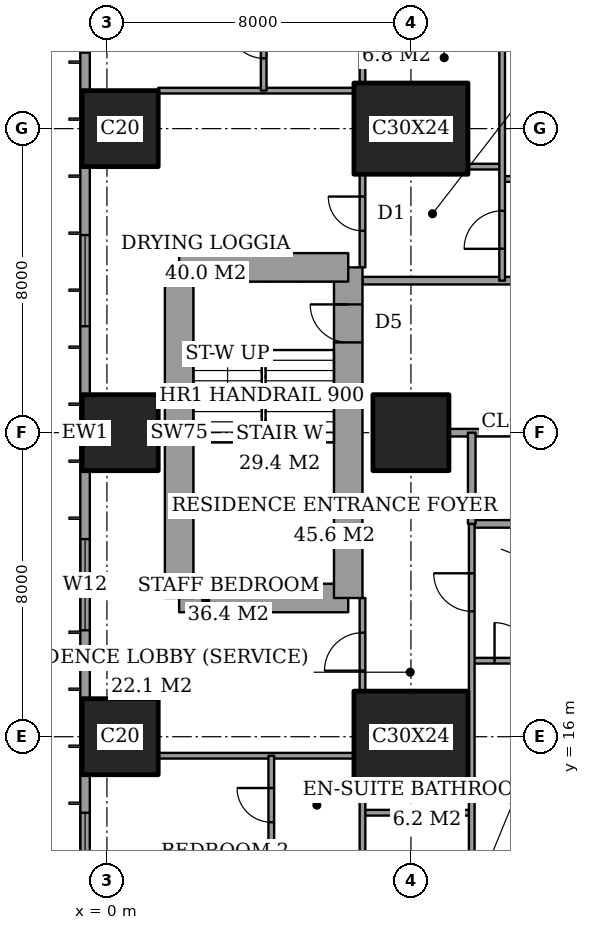
"""IFC4 building model, lengths in metres.
Left out: names, types, materials, properties, quantities, classifications, styles, units other than length and angle.
Written with IfcOpenShell. Run it as: python <this file> out.ifc"""

import sys

from ifc_helpers import new_model, si_unit, direction, frame, frame_2d, origin, origin_2d, place, context, subcontext, project, spatial, rectangle, extrude, element, fill, save


model = new_model("IFC4")
c1 = context("Model", 3, precision=1e-05, world=origin(), true_north=direction((0.0, 1.0)))
c2 = subcontext(c1, "Body", "Model", "MODEL_VIEW")
j1 = project(units=[si_unit("LENGTHUNIT", "METRE"), si_unit("PLANEANGLEUNIT", "RADIAN")], contexts=[c1])
p1 = place(None, origin())
s1 = spatial("IfcSite", under=j1, at=p1, CompositionType="ELEMENT")
p2 = place(p1, origin())
s2 = spatial("IfcBuilding", under=s1, at=p2, CompositionType="ELEMENT")
p3 = place(p2, frame((0.0, 0.0, 164.6)))
s3 = spatial("IfcBuildingStorey", under=s2, at=p3, CompositionType="ELEMENT", Elevation=164.6)
for number, where, z_axis, x_axis in (
    (1, (0.35, 16.0, 0.0), (0.0, 0.0, 1.0), (1.0, 0.0, 0.0)),
    (2, (0.35, 24.0, 0.0), (0.0, 0.0, 1.0), (1.0, 0.0, 0.0)),
    (3, (0.35, 32.0, 0.0), (0.0, 0.0, 1.0), (1.0, 0.0, 0.0)),
):
    element("IfcColumn", number, at=place(p3, frame(where, z_axis=z_axis, x_axis=x_axis)), inside=s3, PredefinedType="COLUMN", context=c2, shape_type="SweptSolid", body=[
        extrude(rectangle(XDim=2.0, YDim=2.0, at=origin_2d()), origin(), (0.0, 0.0, 1.0), 3.6),
    ])
p4 = place(p3, frame((8.0, 16.0, 0.0), z_axis=(0.0, 0.0, 1.0), x_axis=(1.0, 0.0, 0.0)))
e4 = element("IfcColumn", 4, at=p4, inside=s3, PredefinedType="COLUMN", context=c2, shape_type="SweptSolid", body=[
    extrude(rectangle(XDim=3.0, YDim=2.4, at=origin_2d()), origin(), (0.0, 0.0, 1.0), 3.6),
])
p5 = place(p3, frame((8.0, 24.0, 0.0), z_axis=(0.0, 0.0, 1.0), x_axis=(1.0, 0.0, 0.0)))
e5 = element("IfcColumn", 5, at=p5, inside=s3, PredefinedType="COLUMN", context=c2, shape_type="SweptSolid", body=[
    extrude(rectangle(XDim=2.0, YDim=2.0, at=origin_2d()), origin(), (0.0, 0.0, 1.0), 3.6),
])
p6 = place(p3, frame((8.0, 32.0, 0.0), z_axis=(0.0, 0.0, 1.0), x_axis=(1.0, 0.0, 0.0)))
e6 = element("IfcColumn", 6, at=p6, inside=s3, PredefinedType="COLUMN", context=c2, shape_type="SweptSolid", body=[
    extrude(rectangle(XDim=3.0, YDim=2.4, at=origin_2d()), origin(), (0.0, 0.0, 1.0), 3.6),
])
p7 = place(p3, frame((1.9, 19.65, 0.0), z_axis=(0.0, 0.0, 1.0), x_axis=(1.0, 0.0, 0.0)))
e7 = element("IfcWall", 7, at=p7, inside=s3, PredefinedType="SHEAR", context=c2, shape_type="SweptSolid", body=[
    extrude(rectangle(XDim=4.45, YDim=0.75, at=frame_2d((2.225, 0.0))), origin(), (0.0, 0.0, 1.0), 3.6),
])
p8 = place(p3, frame((6.35, 19.65, 0.0), z_axis=(0.0, 0.0, 1.0), x_axis=(0.0, 1.0, 0.0)))
e8 = element("IfcWall", 8, at=p8, inside=s3, PredefinedType="SHEAR", context=c2, shape_type="SweptSolid", body=[
    extrude(rectangle(XDim=8.7, YDim=0.75, at=frame_2d((4.35, 0.0))), origin(), (0.0, 0.0, 1.0), 3.6),
])
p9 = place(p8, frame((6.725, 0.0, 0.0)))
e9 = element("IfcOpeningElement", 9, at=p9, cuts=e8, PredefinedType="OPENING", context=c2, shape_type="SweptSolid", body=[
    extrude(rectangle(XDim=1.0, YDim=2.1, at=frame_2d((0.5, 1.05))), frame((0.0, 0.385, 0.0), z_axis=(0.0, -1.0, 0.0), x_axis=(1.0, 0.0, 0.0)), (0.0, 0.0, 1.0), 0.77),
])
p10 = place(p3, frame((6.35, 28.35, 0.0), z_axis=(0.0, 0.0, 1.0), x_axis=(-1.0, 0.0, 0.0)))
e10 = element("IfcWall", 10, at=p10, inside=s3, PredefinedType="SHEAR", context=c2, shape_type="SweptSolid", body=[
    extrude(rectangle(XDim=4.45, YDim=0.75, at=frame_2d((2.225, 0.0))), origin(), (0.0, 0.0, 1.0), 3.6),
])
p11 = place(p3, frame((1.9, 28.35, 0.0), z_axis=(0.0, 0.0, 1.0), x_axis=(0.0, -1.0, 0.0)))
e11 = element("IfcWall", 11, at=p11, inside=s3, PredefinedType="SHEAR", context=c2, shape_type="SweptSolid", body=[
    extrude(rectangle(XDim=8.7, YDim=0.75, at=frame_2d((4.35, 0.0))), origin(), (0.0, 0.0, 1.0), 3.6),
])
p12 = place(p3, frame((-0.575, 44.825, 0.0), z_axis=(0.0, 0.0, 1.0), x_axis=(0.0, -1.0, 0.0)))
e12 = element("IfcWall", 12, at=p12, inside=s3, PredefinedType="SOLIDWALL", context=c2, shape_type="SweptSolid", body=[
    extrude(rectangle(XDim=41.65, YDim=0.25, at=frame_2d((20.825, 0.0))), origin(), (0.0, 0.0, 1.0), 3.6),
])
p13 = place(p12, frame((0.775, 0.0, 0.4)))
e13 = element("IfcOpeningElement", 13, at=p13, cuts=e12, PredefinedType="OPENING", context=c2, shape_type="SweptSolid", body=[
    extrude(rectangle(XDim=2.4, YDim=2.2, at=frame_2d((1.2, 1.1))), frame((0.0, 0.135, 0.0), z_axis=(0.0, -1.0, 0.0), x_axis=(1.0, 0.0, 0.0)), (0.0, 0.0, 1.0), 0.27),
])
p14 = place(p12, frame((6.1, 0.0, 0.4)))
e14 = element("IfcOpeningElement", 14, at=p14, cuts=e12, PredefinedType="OPENING", context=c2, shape_type="SweptSolid", body=[
    extrude(rectangle(XDim=1.2, YDim=2.2, at=frame_2d((0.6, 1.1))), frame((0.0, 0.135, 0.0), z_axis=(0.0, -1.0, 0.0), x_axis=(1.0, 0.0, 0.0)), (0.0, 0.0, 1.0), 0.27),
])
p15 = place(p12, frame((8.425, 0.0, 0.4)))
e15 = element("IfcOpeningElement", 15, at=p15, cuts=e12, PredefinedType="OPENING", context=c2, shape_type="SweptSolid", body=[
    extrude(rectangle(XDim=2.4, YDim=2.2, at=frame_2d((1.2, 1.1))), frame((0.0, 0.135, 0.0), z_axis=(0.0, -1.0, 0.0), x_axis=(1.0, 0.0, 0.0)), (0.0, 0.0, 1.0), 0.27),
])
p16 = place(p12, frame((15.625, 0.0, 0.4)))
e16 = element("IfcOpeningElement", 16, at=p16, cuts=e12, PredefinedType="OPENING", context=c2, shape_type="SweptSolid", body=[
    extrude(rectangle(XDim=2.4, YDim=2.2, at=frame_2d((1.2, 1.1))), frame((0.0, 0.135, 0.0), z_axis=(0.0, -1.0, 0.0), x_axis=(1.0, 0.0, 0.0)), (0.0, 0.0, 1.0), 0.27),
])
p17 = place(p12, frame((23.625, 0.0, 0.4)))
e17 = element("IfcOpeningElement", 17, at=p17, cuts=e12, PredefinedType="OPENING", context=c2, shape_type="SweptSolid", body=[
    extrude(rectangle(XDim=2.4, YDim=2.2, at=frame_2d((1.2, 1.1))), frame((0.0, 0.135, 0.0), z_axis=(0.0, -1.0, 0.0), x_axis=(1.0, 0.0, 0.0)), (0.0, 0.0, 1.0), 0.27),
])
p18 = place(p12, frame((30.825, 0.0, 0.4)))
e18 = element("IfcOpeningElement", 18, at=p18, cuts=e12, PredefinedType="OPENING", context=c2, shape_type="SweptSolid", body=[
    extrude(rectangle(XDim=2.4, YDim=2.2, at=frame_2d((1.2, 1.1))), frame((0.0, 0.135, 0.0), z_axis=(0.0, -1.0, 0.0), x_axis=(1.0, 0.0, 0.0)), (0.0, 0.0, 1.0), 0.27),
])
p19 = place(p12, frame((34.5, 0.0, 0.4)))
e19 = element("IfcOpeningElement", 19, at=p19, cuts=e12, PredefinedType="OPENING", context=c2, shape_type="SweptSolid", body=[
    extrude(rectangle(XDim=1.2, YDim=2.2, at=frame_2d((0.6, 1.1))), frame((0.0, 0.135, 0.0), z_axis=(0.0, -1.0, 0.0), x_axis=(1.0, 0.0, 0.0)), (0.0, 0.0, 1.0), 0.27),
])
p20 = place(p12, frame((38.475, 0.0, 0.4)))
e20 = element("IfcOpeningElement", 20, at=p20, cuts=e12, PredefinedType="OPENING", context=c2, shape_type="SweptSolid", body=[
    extrude(rectangle(XDim=2.4, YDim=2.2, at=frame_2d((1.2, 1.1))), frame((0.0, 0.135, 0.0), z_axis=(0.0, -1.0, 0.0), x_axis=(1.0, 0.0, 0.0)), (0.0, 0.0, 1.0), 0.27),
])
p21 = place(p3, frame((6.725, 14.0, 0.0), z_axis=(0.0, 0.0, 1.0), x_axis=(1.0, 0.0, 0.0)))
e21 = element("IfcWall", 21, at=p21, inside=s3, PredefinedType="PARTITIONING", context=c2, shape_type="SweptSolid", body=[
    extrude(rectangle(XDim=2.875, YDim=0.15, at=frame_2d((1.438, 0.0))), origin(), (0.0, 0.0, 1.0), 3.35),
])
p22 = place(p3, frame((1.35, 15.5, 0.0), z_axis=(0.0, 0.0, 1.0), x_axis=(1.0, 0.0, 0.0)))
e22 = element("IfcWall", 22, at=p22, inside=s3, PredefinedType="PARTITIONING", context=c2, shape_type="SweptSolid", body=[
    extrude(rectangle(XDim=5.15, YDim=0.15, at=frame_2d((2.575, 0.0))), origin(), (0.0, 0.0, 1.0), 3.35),
])
p23 = place(p3, frame((9.6, 18.0, 0.0), z_axis=(0.0, 0.0, 1.0), x_axis=(1.0, 0.0, 0.0)))
e23 = element("IfcWall", 23, at=p23, inside=s3, PredefinedType="PARTITIONING", context=c2, shape_type="SweptSolid", body=[
    extrude(rectangle(XDim=4.8, YDim=0.15, at=frame_2d((2.4, 0.0))), origin(), (0.0, 0.0, 1.0), 3.35),
])
p24 = place(p23, frame((0.6, 0.0, 0.0)))
e24 = element("IfcOpeningElement", 24, at=p24, cuts=e23, PredefinedType="OPENING", context=c2, shape_type="SweptSolid", body=[
    extrude(rectangle(XDim=1.0, YDim=2.1, at=frame_2d((0.5, 1.05))), frame((0.0, 0.085, 0.0), z_axis=(0.0, -1.0, 0.0), x_axis=(1.0, 0.0, 0.0)), (0.0, 0.0, 1.0), 0.17),
])
p25 = place(p3, frame((9.6, 21.6, 0.0), z_axis=(0.0, 0.0, 1.0), x_axis=(1.0, 0.0, 0.0)))
e25 = element("IfcWall", 25, at=p25, inside=s3, PredefinedType="PARTITIONING", context=c2, shape_type="SweptSolid", body=[
    extrude(rectangle(XDim=5.2, YDim=0.2, at=frame_2d((2.6, 0.0))), origin(), (0.0, 0.0, 1.0), 3.35),
])
p26 = place(p25, frame((2.15, 0.0, 0.0)))
e26 = element("IfcOpeningElement", 26, at=p26, cuts=e25, PredefinedType="OPENING", context=c2, shape_type="SweptSolid", body=[
    extrude(rectangle(XDim=0.9, YDim=2.1, at=frame_2d((0.45, 1.05))), frame((0.0, 0.11, 0.0), z_axis=(0.0, -1.0, 0.0), x_axis=(1.0, 0.0, 0.0)), (0.0, 0.0, 1.0), 0.22),
])
p27 = place(p3, frame((9.0, 24.0, 0.0), z_axis=(0.0, 0.0, 1.0), x_axis=(1.0, 0.0, 0.0)))
e27 = element("IfcWall", 27, at=p27, inside=s3, PredefinedType="PARTITIONING", context=c2, shape_type="SweptSolid", body=[
    extrude(rectangle(XDim=6.0, YDim=0.2, at=frame_2d((3.0, 0.0))), origin(), (0.0, 0.0, 1.0), 3.35),
])
p28 = place(p3, frame((6.725, 28.0, 0.0), z_axis=(0.0, 0.0, 1.0), x_axis=(1.0, 0.0, 0.0)))
e28 = element("IfcWall", 28, at=p28, inside=s3, PredefinedType="PARTITIONING", context=c2, shape_type="SweptSolid", body=[
    extrude(rectangle(XDim=17.275, YDim=0.2, at=frame_2d((8.637, 0.0))), origin(), (0.0, 0.0, 1.0), 3.35),
])
p29 = place(p28, frame((6.875, 0.0, 0.0)))
e29 = element("IfcOpeningElement", 29, at=p29, cuts=e28, PredefinedType="OPENING", context=c2, shape_type="SweptSolid", body=[
    extrude(rectangle(XDim=1.2, YDim=2.4, at=frame_2d((0.6, 1.2))), frame((0.0, 0.11, 0.0), z_axis=(0.0, -1.0, 0.0), x_axis=(1.0, 0.0, 0.0)), (0.0, 0.0, 1.0), 0.22),
])
p30 = place(p3, frame((10.4, 30.675, 0.0), z_axis=(0.0, 0.0, 1.0), x_axis=(1.0, 0.0, 0.0)))
e30 = element("IfcWall", 30, at=p30, inside=s3, PredefinedType="PARTITIONING", context=c2, shape_type="SweptSolid", body=[
    extrude(rectangle(XDim=4.0, YDim=0.15, at=frame_2d((2.0, 0.0))), origin(), (0.0, 0.0, 1.0), 3.35),
])
p31 = place(p30, frame((0.6, 0.0, 0.0)))
e31 = element("IfcOpeningElement", 31, at=p31, cuts=e30, PredefinedType="OPENING", context=c2, shape_type="SweptSolid", body=[
    extrude(rectangle(XDim=1.0, YDim=2.1, at=frame_2d((0.5, 1.05))), frame((0.0, 0.085, 0.0), z_axis=(0.0, -1.0, 0.0), x_axis=(1.0, 0.0, 0.0)), (0.0, 0.0, 1.0), 0.17),
])
p32 = place(p3, frame((9.5, 31.0, 0.0), z_axis=(0.0, 0.0, 1.0), x_axis=(1.0, 0.0, 0.0)))
e32 = element("IfcWall", 32, at=p32, inside=s3, PredefinedType="PARTITIONING", context=c2, shape_type="SweptSolid", body=[
    extrude(rectangle(XDim=0.9, YDim=0.15, at=frame_2d((0.45, 0.0))), origin(), (0.0, 0.0, 1.0), 3.35),
])
p33 = place(p3, frame((1.35, 33.0, 0.0), z_axis=(0.0, 0.0, 1.0), x_axis=(1.0, 0.0, 0.0)))
e33 = element("IfcWall", 33, at=p33, inside=s3, PredefinedType="PARTITIONING", context=c2, shape_type="SweptSolid", body=[
    extrude(rectangle(XDim=5.15, YDim=0.15, at=frame_2d((2.575, 0.0))), origin(), (0.0, 0.0, 1.0), 3.35),
])
p34 = place(p3, frame((4.125, 33.0, 0.0), z_axis=(0.0, 0.0, 1.0), x_axis=(0.0, 1.0, 0.0)))
e34 = element("IfcWall", 34, at=p34, inside=s3, PredefinedType="PARTITIONING", context=c2, shape_type="SweptSolid", body=[
    extrude(rectangle(XDim=2.6, YDim=0.15, at=frame_2d((1.3, 0.0))), origin(), (0.0, 0.0, 1.0), 3.35),
])
p35 = place(p34, frame((0.85, 0.0, 0.0)))
e35 = element("IfcOpeningElement", 35, at=p35, cuts=e34, PredefinedType="OPENING", context=c2, shape_type="SweptSolid", body=[
    extrude(rectangle(XDim=0.9, YDim=2.1, at=frame_2d((0.45, 1.05))), frame((0.0, 0.085, 0.0), z_axis=(0.0, -1.0, 0.0), x_axis=(1.0, 0.0, 0.0)), (0.0, 0.0, 1.0), 0.17),
])
p36 = place(p3, frame((4.325, 12.9, 0.0), z_axis=(0.0, 0.0, 1.0), x_axis=(0.0, 1.0, 0.0)))
e36 = element("IfcWall", 36, at=p36, inside=s3, PredefinedType="PARTITIONING", context=c2, shape_type="SweptSolid", body=[
    extrude(rectangle(XDim=2.6, YDim=0.15, at=frame_2d((1.3, 0.0))), origin(), (0.0, 0.0, 1.0), 3.35),
])
p37 = place(p36, frame((0.85, 0.0, 0.0)))
e37 = element("IfcOpeningElement", 37, at=p37, cuts=e36, PredefinedType="OPENING", context=c2, shape_type="SweptSolid", body=[
    extrude(rectangle(XDim=0.9, YDim=2.1, at=frame_2d((0.45, 1.05))), frame((0.0, 0.085, 0.0), z_axis=(0.0, -1.0, 0.0), x_axis=(1.0, 0.0, 0.0)), (0.0, 0.0, 1.0), 0.17),
])
p38 = place(p3, frame((6.725, 10.6, 0.0), z_axis=(0.0, 0.0, 1.0), x_axis=(0.0, 1.0, 0.0)))
e38 = element("IfcWall", 38, at=p38, inside=s3, PredefinedType="PARTITIONING", context=c2, shape_type="SweptSolid", body=[
    extrude(rectangle(XDim=4.2, YDim=0.15, at=frame_2d((2.1, 0.0))), origin(), (0.0, 0.0, 1.0), 3.35),
])
p39 = place(p3, frame((6.725, 17.2, 0.0), z_axis=(0.0, 0.0, 1.0), x_axis=(0.0, 1.0, 0.0)))
e39 = element("IfcWall", 39, at=p39, inside=s3, PredefinedType="PARTITIONING", context=c2, shape_type="SweptSolid", body=[
    extrude(rectangle(XDim=2.45, YDim=0.15, at=frame_2d((1.225, 0.0))), origin(), (0.0, 0.0, 1.0), 3.35),
])
p40 = place(p39, frame((0.538, 0.0, 0.0)))
e40 = element("IfcOpeningElement", 40, at=p40, cuts=e39, PredefinedType="OPENING", context=c2, shape_type="SweptSolid", body=[
    extrude(rectangle(XDim=1.0, YDim=2.1, at=frame_2d((0.5, 1.05))), frame((0.0, 0.085, 0.0), z_axis=(0.0, -1.0, 0.0), x_axis=(1.0, 0.0, 0.0)), (0.0, 0.0, 1.0), 0.17),
])
p41 = place(p3, frame((6.725, 28.35, 0.0), z_axis=(0.0, 0.0, 1.0), x_axis=(0.0, 1.0, 0.0)))
e41 = element("IfcWall", 41, at=p41, inside=s3, PredefinedType="PARTITIONING", context=c2, shape_type="SweptSolid", body=[
    extrude(rectangle(XDim=2.45, YDim=0.15, at=frame_2d((1.225, 0.0))), origin(), (0.0, 0.0, 1.0), 3.35),
])
p42 = place(p41, frame((0.962, 0.0, 0.0)))
e42 = element("IfcOpeningElement", 42, at=p42, cuts=e41, PredefinedType="OPENING", context=c2, shape_type="SweptSolid", body=[
    extrude(rectangle(XDim=0.9, YDim=2.1, at=frame_2d((0.45, 1.05))), frame((0.0, 0.085, 0.0), z_axis=(0.0, -1.0, 0.0), x_axis=(1.0, 0.0, 0.0)), (0.0, 0.0, 1.0), 0.17),
])
p43 = place(p3, frame((6.725, 33.2, 0.0), z_axis=(0.0, 0.0, 1.0), x_axis=(0.0, 1.0, 0.0)))
e43 = element("IfcWall", 43, at=p43, inside=s3, PredefinedType="PARTITIONING", context=c2, shape_type="SweptSolid", body=[
    extrude(rectangle(XDim=4.2, YDim=0.15, at=frame_2d((2.1, 0.0))), origin(), (0.0, 0.0, 1.0), 3.35),
])
p44 = place(p3, frame((9.6, 21.6, 0.0), z_axis=(0.0, 0.0, 1.0), x_axis=(0.0, 1.0, 0.0)))
e44 = element("IfcWall", 44, at=p44, inside=s3, PredefinedType="PARTITIONING", context=c2, shape_type="SweptSolid", body=[
    extrude(rectangle(XDim=2.4, YDim=0.2, at=frame_2d((1.2, 0.0))), origin(), (0.0, 0.0, 1.0), 3.35),
])
p45 = place(p3, frame((9.6, 10.6, 0.0), z_axis=(0.0, 0.0, 1.0), x_axis=(0.0, 1.0, 0.0)))
e45 = element("IfcWall", 45, at=p45, inside=s3, PredefinedType="PARTITIONING", context=c2, shape_type="SweptSolid", body=[
    extrude(rectangle(XDim=11.0, YDim=0.15, at=frame_2d((5.5, 0.0))), origin(), (0.0, 0.0, 1.0), 3.35),
])
p46 = place(p45, frame((8.7, 0.0, 0.0)))
e46 = element("IfcOpeningElement", 46, at=p46, cuts=e45, PredefinedType="OPENING", context=c2, shape_type="SweptSolid", body=[
    extrude(rectangle(XDim=1.0, YDim=2.1, at=frame_2d((0.5, 1.05))), frame((0.0, 0.085, 0.0), z_axis=(0.0, -1.0, 0.0), x_axis=(1.0, 0.0, 0.0)), (0.0, 0.0, 1.0), 0.17),
])
p47 = place(p3, frame((10.4, 28.0, 0.0), z_axis=(0.0, 0.0, 1.0), x_axis=(0.0, 1.0, 0.0)))
e47 = element("IfcWall", 47, at=p47, inside=s3, PredefinedType="PARTITIONING", context=c2, shape_type="SweptSolid", body=[
    extrude(rectangle(XDim=9.4, YDim=0.15, at=frame_2d((4.7, 0.0))), origin(), (0.0, 0.0, 1.0), 3.35),
])
p48 = place(p47, frame((0.837, 0.0, 0.0)))
e48 = element("IfcOpeningElement", 48, at=p48, cuts=e47, PredefinedType="OPENING", context=c2, shape_type="SweptSolid", body=[
    extrude(rectangle(XDim=1.0, YDim=2.1, at=frame_2d((0.5, 1.05))), frame((0.0, 0.085, 0.0), z_axis=(0.0, -1.0, 0.0), x_axis=(1.0, 0.0, 0.0)), (0.0, 0.0, 1.0), 0.17),
])
p49 = place(p16, origin())
e49 = element("IfcWindow", 49, at=p49, inside=s3, PartitioningType="SINGLE_PANEL", PredefinedType="WINDOW", context=c2, shape_type="SweptSolid", body=[
    extrude(rectangle(XDim=2.4, YDim=2.2, at=frame_2d((1.2, 1.1))), frame((0.0, 0.03, 0.0), z_axis=(0.0, -1.0, 0.0), x_axis=(1.0, 0.0, 0.0)), (0.0, 0.0, 1.0), 0.06),
])
fill(e16, e49)
p50 = place(p17, origin())
e50 = element("IfcWindow", 50, at=p50, inside=s3, PartitioningType="SINGLE_PANEL", PredefinedType="WINDOW", context=c2, shape_type="SweptSolid", body=[
    extrude(rectangle(XDim=2.4, YDim=2.2, at=frame_2d((1.2, 1.1))), frame((0.0, 0.03, 0.0), z_axis=(0.0, -1.0, 0.0), x_axis=(1.0, 0.0, 0.0)), (0.0, 0.0, 1.0), 0.06),
])
fill(e17, e50)
p51 = place(p18, origin())
e51 = element("IfcWindow", 51, at=p51, inside=s3, PartitioningType="SINGLE_PANEL", PredefinedType="WINDOW", context=c2, shape_type="SweptSolid", body=[
    extrude(rectangle(XDim=2.4, YDim=2.2, at=frame_2d((1.2, 1.1))), frame((0.0, 0.03, 0.0), z_axis=(0.0, -1.0, 0.0), x_axis=(1.0, 0.0, 0.0)), (0.0, 0.0, 1.0), 0.06),
])
fill(e18, e51)
p52 = place(p37, origin())
e52 = element("IfcDoor", 52, at=p52, inside=s3, OperationType="SINGLE_SWING_LEFT", PredefinedType="DOOR", context=c2, shape_type="SweptSolid", body=[
    extrude(rectangle(XDim=0.9, YDim=2.1, at=frame_2d((0.45, 1.05))), frame((0.0, 0.025, 0.0), z_axis=(0.0, -1.0, 0.0), x_axis=(1.0, 0.0, 0.0)), (0.0, 0.0, 1.0), 0.05),
])
fill(e37, e52)
p53 = place(p40, origin())
e53 = element("IfcDoor", 53, at=p53, inside=s3, OperationType="SINGLE_SWING_RIGHT", PredefinedType="DOOR", context=c2, shape_type="SweptSolid", body=[
    extrude(rectangle(XDim=1.0, YDim=2.1, at=frame_2d((0.5, 1.05))), frame((0.0, 0.025, 0.0), z_axis=(0.0, -1.0, 0.0), x_axis=(1.0, 0.0, 0.0)), (0.0, 0.0, 1.0), 0.05),
])
fill(e40, e53)
p54 = place(p46, origin())
e54 = element("IfcDoor", 54, at=p54, inside=s3, OperationType="SINGLE_SWING_LEFT", PredefinedType="DOOR", context=c2, shape_type="SweptSolid", body=[
    extrude(rectangle(XDim=1.0, YDim=2.1, at=frame_2d((0.5, 1.05))), frame((0.0, 0.025, 0.0), z_axis=(0.0, -1.0, 0.0), x_axis=(1.0, 0.0, 0.0)), (0.0, 0.0, 1.0), 0.05),
])
fill(e46, e54)
p55 = place(p24, origin())
e55 = element("IfcDoor", 55, at=p55, inside=s3, OperationType="SINGLE_SWING_RIGHT", PredefinedType="DOOR", context=c2, shape_type="SweptSolid", body=[
    extrude(rectangle(XDim=1.0, YDim=2.1, at=frame_2d((0.5, 1.05))), frame((0.0, 0.025, 0.0), z_axis=(0.0, -1.0, 0.0), x_axis=(1.0, 0.0, 0.0)), (0.0, 0.0, 1.0), 0.05),
])
fill(e24, e55)
p56 = place(p35, origin())
e56 = element("IfcDoor", 56, at=p56, inside=s3, OperationType="SINGLE_SWING_LEFT", PredefinedType="DOOR", context=c2, shape_type="SweptSolid", body=[
    extrude(rectangle(XDim=0.9, YDim=2.1, at=frame_2d((0.45, 1.05))), frame((0.0, 0.025, 0.0), z_axis=(0.0, -1.0, 0.0), x_axis=(1.0, 0.0, 0.0)), (0.0, 0.0, 1.0), 0.05),
])
fill(e35, e56)
p57 = place(p42, origin())
e57 = element("IfcDoor", 57, at=p57, inside=s3, OperationType="SINGLE_SWING_LEFT", PredefinedType="DOOR", context=c2, shape_type="SweptSolid", body=[
    extrude(rectangle(XDim=0.9, YDim=2.1, at=frame_2d((0.45, 1.05))), frame((0.0, 0.025, 0.0), z_axis=(0.0, -1.0, 0.0), x_axis=(1.0, 0.0, 0.0)), (0.0, 0.0, 1.0), 0.05),
])
fill(e42, e57)
p58 = place(p48, origin())
e58 = element("IfcDoor", 58, at=p58, inside=s3, OperationType="SINGLE_SWING_RIGHT", PredefinedType="DOOR", context=c2, shape_type="SweptSolid", body=[
    extrude(rectangle(XDim=1.0, YDim=2.1, at=frame_2d((0.5, 1.05))), frame((0.0, 0.025, 0.0), z_axis=(0.0, -1.0, 0.0), x_axis=(1.0, 0.0, 0.0)), (0.0, 0.0, 1.0), 0.05),
])
fill(e48, e58)
p59 = place(p9, origin())
e59 = element("IfcDoor", 59, at=p59, inside=s3, OperationType="SINGLE_SWING_LEFT", PredefinedType="DOOR", context=c2, shape_type="SweptSolid", body=[
    extrude(rectangle(XDim=1.0, YDim=2.1, at=frame_2d((0.5, 1.05))), frame((0.0, 0.025, 0.0), z_axis=(0.0, -1.0, 0.0), x_axis=(1.0, 0.0, 0.0)), (0.0, 0.0, 1.0), 0.05),
])
fill(e9, e59)
save(model, sys.argv[1])
